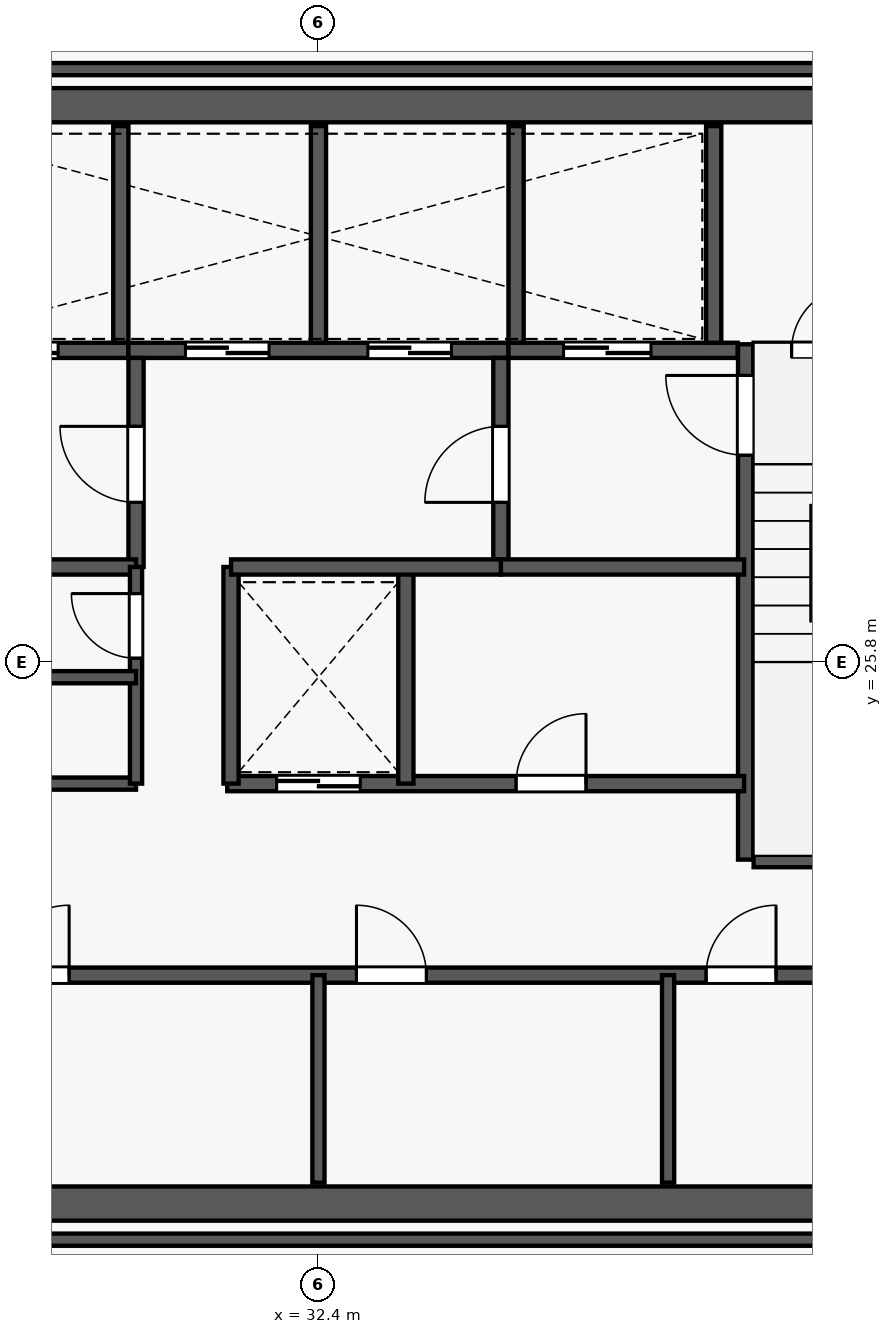
"""IFC4 building model, lengths in metres.
Left out: names, types, materials, properties, quantities, classifications, styles, units other than length and angle.
Written with IfcOpenShell. Run it as: python <this file> out.ifc"""

import sys

from ifc_helpers import new_model, si_unit, direction, frame, frame_2d, origin, place, context, subcontext, project, spatial, rectangle, extrude, element, fill, save


model = new_model("IFC4")
c1 = context("Model", 3, precision=1e-05, world=origin(), true_north=direction((0.0, 1.0)))
c2 = subcontext(c1, "Body", "Model", "MODEL_VIEW")
j1 = project(units=[si_unit("LENGTHUNIT", "METRE"), si_unit("PLANEANGLEUNIT", "RADIAN")], contexts=[c1])
p1 = place(None, origin())
s1 = spatial("IfcSite", under=j1, at=p1, CompositionType="ELEMENT")
p2 = place(p1, origin())
s2 = spatial("IfcBuilding", under=s1, at=p2, CompositionType="ELEMENT")
p3 = place(p2, frame((0.0, 0.0, 278.1)))
s3 = spatial("IfcBuildingStorey", under=s2, at=p3, CompositionType="ELEMENT", Elevation=278.1)
for number, where, z_axis, x_axis in (
    (1, (23.5, 18.675, 0.0), (0.0, 0.0, 1.0), (1.0, 0.0, 0.0)),
    (2, (23.5, 33.125, 0.0), (0.0, 0.0, 1.0), (1.0, 0.0, 0.0)),
):
    element("IfcWall", number, at=place(p3, frame(where, z_axis=z_axis, x_axis=x_axis)), inside=s3, PredefinedType="SHEAR", context=c2, shape_type="SweptSolid", body=[
        extrude(rectangle(XDim=17.8, YDim=0.45, at=frame_2d((8.9, 0.0))), origin(), (0.0, 0.0, 1.0), 5.2),
    ])
p4 = place(p3, frame((38.02, 23.2, 0.0), z_axis=(0.0, 0.0, 1.0), x_axis=(0.0, 1.0, 0.0)))
e3 = element("IfcWall", 3, at=p4, inside=s3, PredefinedType="SHEAR", context=c2, shape_type="SweptSolid", body=[
    extrude(rectangle(XDim=6.78, YDim=0.2, at=frame_2d((3.39, 0.0))), origin(), (0.0, 0.0, 1.0), 5.4),
])
p5 = place(p4, frame((5.32, 0.0, 0.0)))
e4 = element("IfcOpeningElement", 4, at=p5, cuts=e3, PredefinedType="OPENING", context=c2, shape_type="SweptSolid", body=[
    extrude(rectangle(XDim=1.05, YDim=2.15, at=frame_2d((0.525, 1.075))), frame((0.0, 0.11, 0.0), z_axis=(0.0, -1.0, 0.0), x_axis=(1.0, 0.0, 0.0)), (0.0, 0.0, 1.0), 0.22),
])
p6 = place(p3, frame((38.125, 23.2, 0.0), z_axis=(0.0, 0.0, 1.0), x_axis=(1.0, 0.0, 0.0)))
e5 = element("IfcWall", 5, at=p6, inside=s3, PredefinedType="PLUMBINGWALL", context=c2, shape_type="SweptSolid", body=[
    extrude(rectangle(XDim=3.27, YDim=0.2, at=frame_2d((1.635, 0.0))), origin(), (0.0, 0.0, 1.0), 5.2),
])
p7 = place(p3, frame((26.885, 29.9, 0.0), z_axis=(0.0, 0.0, 1.0), x_axis=(1.0, 0.0, 0.0)))
e6 = element("IfcWall", 6, at=p7, inside=s3, PredefinedType="PLUMBINGWALL", context=c2, shape_type="SweptSolid", body=[
    extrude(rectangle(XDim=3.015, YDim=0.2, at=frame_2d((1.507, 0.0))), origin(), (0.0, 0.0, 1.0), 5.2),
])
p8 = place(p7, frame((0.94, 0.0, 0.0)))
e7 = element("IfcOpeningElement", 7, at=p8, cuts=e6, PredefinedType="OPENING", context=c2, shape_type="SweptSolid", body=[
    extrude(rectangle(XDim=1.15, YDim=2.2, at=frame_2d((0.575, 1.1))), frame((0.0, 0.11, 0.0), z_axis=(0.0, -1.0, 0.0), x_axis=(1.0, 0.0, 0.0)), (0.0, 0.0, 1.0), 0.22),
])
p9 = place(p3, frame((29.9, 29.9, 0.0), z_axis=(0.0, 0.0, 1.0), x_axis=(1.0, 0.0, 0.0)))
e8 = element("IfcWall", 8, at=p9, inside=s3, PredefinedType="PLUMBINGWALL", context=c2, shape_type="SweptSolid", body=[
    extrude(rectangle(XDim=5.0, YDim=0.2, at=frame_2d((2.5, 0.0))), origin(), (0.0, 0.0, 1.0), 5.2),
])
p10 = place(p9, frame((0.75, 0.0, 0.0)))
e9 = element("IfcOpeningElement", 9, at=p10, cuts=e8, PredefinedType="OPENING", context=c2, shape_type="SweptSolid", body=[
    extrude(rectangle(XDim=1.1, YDim=2.2, at=frame_2d((0.55, 1.1))), frame((0.0, 0.11, 0.0), z_axis=(0.0, -1.0, 0.0), x_axis=(1.0, 0.0, 0.0)), (0.0, 0.0, 1.0), 0.22),
])
p11 = place(p9, frame((3.15, 0.0, 0.0)))
e10 = element("IfcOpeningElement", 10, at=p11, cuts=e8, PredefinedType="OPENING", context=c2, shape_type="SweptSolid", body=[
    extrude(rectangle(XDim=1.1, YDim=2.2, at=frame_2d((0.55, 1.1))), frame((0.0, 0.11, 0.0), z_axis=(0.0, -1.0, 0.0), x_axis=(1.0, 0.0, 0.0)), (0.0, 0.0, 1.0), 0.22),
])
p12 = place(p3, frame((34.9, 29.9, 0.0), z_axis=(0.0, 0.0, 1.0), x_axis=(1.0, 0.0, 0.0)))
e11 = element("IfcWall", 11, at=p12, inside=s3, PredefinedType="PLUMBINGWALL", context=c2, shape_type="SweptSolid", body=[
    extrude(rectangle(XDim=3.015, YDim=0.2, at=frame_2d((1.508, 0.0))), origin(), (0.0, 0.0, 1.0), 5.2),
])
p13 = place(p12, frame((0.725, 0.0, 0.0)))
e12 = element("IfcOpeningElement", 12, at=p13, cuts=e11, PredefinedType="OPENING", context=c2, shape_type="SweptSolid", body=[
    extrude(rectangle(XDim=1.15, YDim=2.2, at=frame_2d((0.575, 1.1))), frame((0.0, 0.11, 0.0), z_axis=(0.0, -1.0, 0.0), x_axis=(1.0, 0.0, 0.0)), (0.0, 0.0, 1.0), 0.22),
])
p14 = place(p3, frame((38.125, 29.9, 0.0), z_axis=(0.0, 0.0, 1.0), x_axis=(1.0, 0.0, 0.0)))
e13 = element("IfcWall", 13, at=p14, inside=s3, PredefinedType="PLUMBINGWALL", context=c2, shape_type="SweptSolid", body=[
    extrude(rectangle(XDim=3.27, YDim=0.2, at=frame_2d((1.635, 0.0))), origin(), (0.0, 0.0, 1.0), 5.2),
])
p15 = place(p14, frame((0.5, 0.0, 0.0)))
e14 = element("IfcOpeningElement", 14, at=p15, cuts=e13, PredefinedType="OPENING", context=c2, shape_type="SweptSolid", body=[
    extrude(rectangle(XDim=0.85, YDim=2.05, at=frame_2d((0.425, 1.025))), frame((0.0, 0.11, 0.0), z_axis=(0.0, -1.0, 0.0), x_axis=(1.0, 0.0, 0.0)), (0.0, 0.0, 1.0), 0.22),
])
for number, where, z_axis, x_axis in (
    (15, (29.8, 30.0, 0.0), (0.0, 0.0, 1.0), (0.0, 1.0, 0.0)),
    (16, (32.4, 30.0, 0.0), (0.0, 0.0, 1.0), (0.0, 1.0, 0.0)),
    (17, (35.0, 30.0, 0.0), (0.0, 0.0, 1.0), (0.0, 1.0, 0.0)),
    (18, (37.6, 30.0, 0.0), (0.0, 0.0, 1.0), (0.0, 1.0, 0.0)),
):
    element("IfcWall", number, at=place(p3, frame(where, z_axis=z_axis, x_axis=x_axis)), inside=s3, PredefinedType="PLUMBINGWALL", context=c2, shape_type="SweptSolid", body=[
        extrude(rectangle(XDim=2.85, YDim=0.2, at=frame_2d((1.425, 0.0))), origin(), (0.0, 0.0, 1.0), 5.2),
    ])
p16 = place(p3, frame((30.0, 27.05, 0.0), z_axis=(0.0, 0.0, 1.0), x_axis=(0.0, 1.0, 0.0)))
e19 = element("IfcWall", 19, at=p16, inside=s3, PredefinedType="PLUMBINGWALL", context=c2, shape_type="SweptSolid", body=[
    extrude(rectangle(XDim=2.75, YDim=0.2, at=frame_2d((1.375, 0.0))), origin(), (0.0, 0.0, 1.0), 5.2),
])
p17 = place(p16, frame((0.85, 0.0, 0.0)))
e20 = element("IfcOpeningElement", 20, at=p17, cuts=e19, PredefinedType="OPENING", context=c2, shape_type="SweptSolid", body=[
    extrude(rectangle(XDim=1.0, YDim=2.15, at=frame_2d((0.5, 1.075))), frame((0.0, 0.11, 0.0), z_axis=(0.0, -1.0, 0.0), x_axis=(1.0, 0.0, 0.0)), (0.0, 0.0, 1.0), 0.22),
])
p18 = place(p3, frame((26.8, 27.05, 0.0), z_axis=(0.0, 0.0, 1.0), x_axis=(1.0, 0.0, 0.0)))
e21 = element("IfcWall", 21, at=p18, inside=s3, PredefinedType="PLUMBINGWALL", context=c2, shape_type="SweptSolid", body=[
    extrude(rectangle(XDim=3.2, YDim=0.2, at=frame_2d((1.6, 0.0))), origin(), (0.0, 0.0, 1.0), 5.2),
])
p19 = place(p3, frame((34.8, 27.05, 0.0), z_axis=(0.0, 0.0, 1.0), x_axis=(0.0, 1.0, 0.0)))
e22 = element("IfcWall", 22, at=p19, inside=s3, PredefinedType="PLUMBINGWALL", context=c2, shape_type="SweptSolid", body=[
    extrude(rectangle(XDim=2.75, YDim=0.2, at=frame_2d((1.375, 0.0))), origin(), (0.0, 0.0, 1.0), 5.2),
])
p20 = place(p19, frame((0.85, 0.0, 0.0)))
e23 = element("IfcOpeningElement", 23, at=p20, cuts=e22, PredefinedType="OPENING", context=c2, shape_type="SweptSolid", body=[
    extrude(rectangle(XDim=1.0, YDim=2.15, at=frame_2d((0.5, 1.075))), frame((0.0, 0.11, 0.0), z_axis=(0.0, -1.0, 0.0), x_axis=(1.0, 0.0, 0.0)), (0.0, 0.0, 1.0), 0.22),
])
p21 = place(p3, frame((34.8, 27.05, 0.0), z_axis=(0.0, 0.0, 1.0), x_axis=(1.0, 0.0, 0.0)))
e24 = element("IfcWall", 24, at=p21, inside=s3, PredefinedType="PLUMBINGWALL", context=c2, shape_type="SweptSolid", body=[
    extrude(rectangle(XDim=3.2, YDim=0.2, at=frame_2d((1.6, 0.0))), origin(), (0.0, 0.0, 1.0), 5.2),
])
p22 = place(p3, frame((26.8, 24.2, 0.0), z_axis=(0.0, 0.0, 1.0), x_axis=(1.0, 0.0, 0.0)))
e25 = element("IfcWall", 25, at=p22, inside=s3, PredefinedType="PARTITIONING", context=c2, shape_type="SweptSolid", body=[
    extrude(rectangle(XDim=3.2, YDim=0.16, at=frame_2d((1.6, 0.0))), origin(), (0.0, 0.0, 1.0), 5.2),
])
p23 = place(p22, frame((0.9, 0.0, 0.0)))
e26 = element("IfcOpeningElement", 26, at=p23, cuts=e25, PredefinedType="OPENING", context=c2, shape_type="SweptSolid", body=[
    extrude(rectangle(XDim=0.85, YDim=2.05, at=frame_2d((0.425, 1.025))), frame((0.0, 0.09, 0.0), z_axis=(0.0, -1.0, 0.0), x_axis=(1.0, 0.0, 0.0)), (0.0, 0.0, 1.0), 0.18),
])
p24 = place(p3, frame((30.0, 24.2, 0.0), z_axis=(0.0, 0.0, 1.0), x_axis=(0.0, 1.0, 0.0)))
e27 = element("IfcWall", 27, at=p24, inside=s3, PredefinedType="PARTITIONING", context=c2, shape_type="SweptSolid", body=[
    extrude(rectangle(XDim=2.85, YDim=0.16, at=frame_2d((1.425, 0.0))), origin(), (0.0, 0.0, 1.0), 5.2),
])
p25 = place(p24, frame((1.65, 0.0, 0.0)))
e28 = element("IfcOpeningElement", 28, at=p25, cuts=e27, PredefinedType="OPENING", context=c2, shape_type="SweptSolid", body=[
    extrude(rectangle(XDim=0.85, YDim=2.05, at=frame_2d((0.425, 1.025))), frame((0.0, 0.09, 0.0), z_axis=(0.0, -1.0, 0.0), x_axis=(1.0, 0.0, 0.0)), (0.0, 0.0, 1.0), 0.18),
])
p26 = place(p3, frame((31.2, 24.2, 0.0), z_axis=(0.0, 0.0, 1.0), x_axis=(1.0, 0.0, 0.0)))
e29 = element("IfcWall", 29, at=p26, inside=s3, PredefinedType="PLUMBINGWALL", context=c2, shape_type="SweptSolid", body=[
    extrude(rectangle(XDim=6.8, YDim=0.2, at=frame_2d((3.4, 0.0))), origin(), (0.0, 0.0, 1.0), 5.2),
])
p27 = place(p26, frame((0.65, 0.0, 0.0)))
e30 = element("IfcOpeningElement", 30, at=p27, cuts=e29, PredefinedType="OPENING", context=c2, shape_type="SweptSolid", body=[
    extrude(rectangle(XDim=1.1, YDim=2.2, at=frame_2d((0.55, 1.1))), frame((0.0, 0.11, 0.0), z_axis=(0.0, -1.0, 0.0), x_axis=(1.0, 0.0, 0.0)), (0.0, 0.0, 1.0), 0.22),
])
p28 = place(p26, frame((3.8, 0.0, 0.0)))
e31 = element("IfcOpeningElement", 31, at=p28, cuts=e29, PredefinedType="OPENING", context=c2, shape_type="SweptSolid", body=[
    extrude(rectangle(XDim=0.92, YDim=2.15, at=frame_2d((0.46, 1.075))), frame((0.0, 0.11, 0.0), z_axis=(0.0, -1.0, 0.0), x_axis=(1.0, 0.0, 0.0)), (0.0, 0.0, 1.0), 0.22),
])
for number, where, z_axis, x_axis in (
    (32, (31.25, 24.2, 0.0), (0.0, 0.0, 1.0), (0.0, 1.0, 0.0)),
    (33, (33.55, 24.2, 0.0), (0.0, 0.0, 1.0), (0.0, 1.0, 0.0)),
):
    element("IfcWall", number, at=place(p3, frame(where, z_axis=z_axis, x_axis=x_axis)), inside=s3, PredefinedType="PLUMBINGWALL", context=c2, shape_type="SweptSolid", body=[
        extrude(rectangle(XDim=2.85, YDim=0.2, at=frame_2d((1.425, 0.0))), origin(), (0.0, 0.0, 1.0), 5.2),
    ])
p29 = place(p3, frame((31.25, 27.05, 0.0), z_axis=(0.0, 0.0, 1.0), x_axis=(1.0, 0.0, 0.0)))
e34 = element("IfcWall", 34, at=p29, inside=s3, PredefinedType="PLUMBINGWALL", context=c2, shape_type="SweptSolid", body=[
    extrude(rectangle(XDim=3.55, YDim=0.2, at=frame_2d((1.775, 0.0))), origin(), (0.0, 0.0, 1.0), 5.2),
])
p30 = place(p3, frame((26.8, 25.6, 0.0), z_axis=(0.0, 0.0, 1.0), x_axis=(1.0, 0.0, 0.0)))
e35 = element("IfcWall", 35, at=p30, inside=s3, PredefinedType="PARTITIONING", context=c2, shape_type="SweptSolid", body=[
    extrude(rectangle(XDim=3.2, YDim=0.16, at=frame_2d((1.6, 0.0))), origin(), (0.0, 0.0, 1.0), 5.2),
])
p31 = place(p3, frame((23.42, 21.68, 0.0), z_axis=(0.0, 0.0, 1.0), x_axis=(1.0, 0.0, 0.0)))
e36 = element("IfcWall", 36, at=p31, inside=s3, PredefinedType="PLUMBINGWALL", context=c2, shape_type="SweptSolid", body=[
    extrude(rectangle(XDim=17.96, YDim=0.2, at=frame_2d((8.98, 0.0))), origin(), (0.0, 0.0, 1.0), 5.2),
])
p32 = place(p31, frame((0.46, 0.0, 0.0)))
e37 = element("IfcOpeningElement", 37, at=p32, cuts=e36, PredefinedType="OPENING", context=c2, shape_type="SweptSolid", body=[
    extrude(rectangle(XDim=0.92, YDim=2.15, at=frame_2d((0.46, 1.075))), frame((0.0, 0.11, 0.0), z_axis=(0.0, -1.0, 0.0), x_axis=(1.0, 0.0, 0.0)), (0.0, 0.0, 1.0), 0.22),
])
p33 = place(p31, frame((4.78, 0.0, 0.0)))
e38 = element("IfcOpeningElement", 38, at=p33, cuts=e36, PredefinedType="OPENING", context=c2, shape_type="SweptSolid", body=[
    extrude(rectangle(XDim=0.92, YDim=2.15, at=frame_2d((0.46, 1.075))), frame((0.0, 0.11, 0.0), z_axis=(0.0, -1.0, 0.0), x_axis=(1.0, 0.0, 0.0)), (0.0, 0.0, 1.0), 0.22),
])
p34 = place(p31, frame((9.48, 0.0, 0.0)))
e39 = element("IfcOpeningElement", 39, at=p34, cuts=e36, PredefinedType="OPENING", context=c2, shape_type="SweptSolid", body=[
    extrude(rectangle(XDim=0.92, YDim=2.15, at=frame_2d((0.46, 1.075))), frame((0.0, 0.11, 0.0), z_axis=(0.0, -1.0, 0.0), x_axis=(1.0, 0.0, 0.0)), (0.0, 0.0, 1.0), 0.22),
])
p35 = place(p31, frame((14.08, 0.0, 0.0)))
e40 = element("IfcOpeningElement", 40, at=p35, cuts=e36, PredefinedType="OPENING", context=c2, shape_type="SweptSolid", body=[
    extrude(rectangle(XDim=0.92, YDim=2.15, at=frame_2d((0.46, 1.075))), frame((0.0, 0.11, 0.0), z_axis=(0.0, -1.0, 0.0), x_axis=(1.0, 0.0, 0.0)), (0.0, 0.0, 1.0), 0.22),
])
for number, where, z_axis, x_axis in (
    (41, (32.4, 18.95, 0.0), (0.0, 0.0, 1.0), (0.0, 1.0, 0.0)),
    (42, (37.0, 18.95, 0.0), (0.0, 0.0, 1.0), (0.0, 1.0, 0.0)),
):
    element("IfcWall", number, at=place(p3, frame(where, z_axis=z_axis, x_axis=x_axis)), inside=s3, PredefinedType="PARTITIONING", context=c2, shape_type="SweptSolid", body=[
        extrude(rectangle(XDim=2.73, YDim=0.16, at=frame_2d((1.365, 0.0))), origin(), (0.0, 0.0, 1.0), 5.2),
    ])
p36 = place(p3, frame((14.978, 18.2, 0.0), z_axis=(0.0, 0.0, 1.0), x_axis=(1.0, 0.0, 0.0)))
e43 = element("IfcWall", 43, at=p36, inside=s3, PredefinedType="PARTITIONING", context=c2, shape_type="SweptSolid", body=[
    extrude(rectangle(XDim=34.844, YDim=0.16, at=frame_2d((17.422, 0.0))), origin(), (0.0, 0.0, 1.0), 5.2),
])
p37 = place(p36, frame((5.972, 0.0, 0.0)))
e44 = element("IfcOpeningElement", 44, at=p37, cuts=e43, PredefinedType="OPENING", context=c2, shape_type="SweptSolid", body=[
    extrude(rectangle(XDim=1.35, YDim=2.35, at=frame_2d((0.675, 1.175))), frame((0.0, 0.09, 0.0), z_axis=(0.0, -1.0, 0.0), x_axis=(1.0, 0.0, 0.0)), (0.0, 0.0, 1.0), 0.18),
])
p38 = place(p36, frame((27.722, 0.0, 0.0)))
e45 = element("IfcOpeningElement", 45, at=p38, cuts=e43, PredefinedType="OPENING", context=c2, shape_type="SweptSolid", body=[
    extrude(rectangle(XDim=1.35, YDim=2.35, at=frame_2d((0.675, 1.175))), frame((0.0, 0.09, 0.0), z_axis=(0.0, -1.0, 0.0), x_axis=(1.0, 0.0, 0.0)), (0.0, 0.0, 1.0), 0.18),
])
p39 = place(p3, frame((15.079, 33.6, 0.0), z_axis=(0.0, 0.0, 1.0), x_axis=(1.0, 0.0, 0.0)))
e46 = element("IfcWall", 46, at=p39, inside=s3, PredefinedType="PARTITIONING", context=c2, shape_type="SweptSolid", body=[
    extrude(rectangle(XDim=34.642, YDim=0.16, at=frame_2d((17.321, 0.0))), origin(), (0.0, 0.0, 1.0), 5.2),
])
p40 = place(p39, frame((5.871, 0.0, 0.0)))
e47 = element("IfcOpeningElement", 47, at=p40, cuts=e46, PredefinedType="OPENING", context=c2, shape_type="SweptSolid", body=[
    extrude(rectangle(XDim=1.35, YDim=2.35, at=frame_2d((0.675, 1.175))), frame((0.0, 0.09, 0.0), z_axis=(0.0, -1.0, 0.0), x_axis=(1.0, 0.0, 0.0)), (0.0, 0.0, 1.0), 0.18),
])
p41 = place(p39, frame((27.271, 0.0, 0.0)))
e48 = element("IfcOpeningElement", 48, at=p41, cuts=e46, PredefinedType="OPENING", context=c2, shape_type="SweptSolid", body=[
    extrude(rectangle(XDim=1.35, YDim=2.35, at=frame_2d((0.675, 1.175))), frame((0.0, 0.09, 0.0), z_axis=(0.0, -1.0, 0.0), x_axis=(1.0, 0.0, 0.0)), (0.0, 0.0, 1.0), 0.18),
])
p42 = place(p5, origin())
e49 = element("IfcDoor", 49, at=p42, inside=s3, OperationType="SINGLE_SWING_RIGHT", PredefinedType="DOOR", context=c2, shape_type="SweptSolid", body=[
    extrude(rectangle(XDim=1.05, YDim=2.15, at=frame_2d((0.525, 1.075))), frame((0.0, 0.025, 0.0), z_axis=(0.0, -1.0, 0.0), x_axis=(1.0, 0.0, 0.0)), (0.0, 0.0, 1.0), 0.05),
])
fill(e4, e49)
p43 = place(p15, origin())
e50 = element("IfcDoor", 50, at=p43, inside=s3, OperationType="SINGLE_SWING_RIGHT", PredefinedType="DOOR", context=c2, shape_type="SweptSolid", body=[
    extrude(rectangle(XDim=0.85, YDim=2.05, at=frame_2d((0.425, 1.025))), frame((0.0, 0.025, 0.0), z_axis=(0.0, -1.0, 0.0), x_axis=(1.0, 0.0, 0.0)), (0.0, 0.0, 1.0), 0.05),
])
fill(e14, e50)
p44 = place(p8, origin())
e51 = element("IfcDoor", 51, at=p44, inside=s3, OperationType="DOUBLE_DOOR_SLIDING", PredefinedType="DOOR", context=c2, shape_type="SweptSolid", body=[
    extrude(rectangle(XDim=1.15, YDim=2.2, at=frame_2d((0.575, 1.1))), frame((0.0, 0.025, 0.0), z_axis=(0.0, -1.0, 0.0), x_axis=(1.0, 0.0, 0.0)), (0.0, 0.0, 1.0), 0.05),
])
fill(e7, e51)
p45 = place(p13, origin())
e52 = element("IfcDoor", 52, at=p45, inside=s3, OperationType="DOUBLE_DOOR_SLIDING", PredefinedType="DOOR", context=c2, shape_type="SweptSolid", body=[
    extrude(rectangle(XDim=1.15, YDim=2.2, at=frame_2d((0.575, 1.1))), frame((0.0, 0.025, 0.0), z_axis=(0.0, -1.0, 0.0), x_axis=(1.0, 0.0, 0.0)), (0.0, 0.0, 1.0), 0.05),
])
fill(e12, e52)
p46 = place(p10, origin())
e53 = element("IfcDoor", 53, at=p46, inside=s3, OperationType="DOUBLE_DOOR_SLIDING", PredefinedType="DOOR", context=c2, shape_type="SweptSolid", body=[
    extrude(rectangle(XDim=1.1, YDim=2.2, at=frame_2d((0.55, 1.1))), frame((0.0, 0.025, 0.0), z_axis=(0.0, -1.0, 0.0), x_axis=(1.0, 0.0, 0.0)), (0.0, 0.0, 1.0), 0.05),
])
fill(e9, e53)
p47 = place(p11, origin())
e54 = element("IfcDoor", 54, at=p47, inside=s3, OperationType="DOUBLE_DOOR_SLIDING", PredefinedType="DOOR", context=c2, shape_type="SweptSolid", body=[
    extrude(rectangle(XDim=1.1, YDim=2.2, at=frame_2d((0.55, 1.1))), frame((0.0, 0.025, 0.0), z_axis=(0.0, -1.0, 0.0), x_axis=(1.0, 0.0, 0.0)), (0.0, 0.0, 1.0), 0.05),
])
fill(e10, e54)
p48 = place(p17, origin())
e55 = element("IfcDoor", 55, at=p48, inside=s3, OperationType="SINGLE_SWING_RIGHT", PredefinedType="DOOR", context=c2, shape_type="SweptSolid", body=[
    extrude(rectangle(XDim=1.0, YDim=2.15, at=frame_2d((0.5, 1.075))), frame((0.0, 0.025, 0.0), z_axis=(0.0, -1.0, 0.0), x_axis=(1.0, 0.0, 0.0)), (0.0, 0.0, 1.0), 0.05),
])
fill(e20, e55)
p49 = place(p20, origin())
e56 = element("IfcDoor", 56, at=p49, inside=s3, OperationType="SINGLE_SWING_LEFT", PredefinedType="DOOR", context=c2, shape_type="SweptSolid", body=[
    extrude(rectangle(XDim=1.0, YDim=2.15, at=frame_2d((0.5, 1.075))), frame((0.0, 0.025, 0.0), z_axis=(0.0, -1.0, 0.0), x_axis=(1.0, 0.0, 0.0)), (0.0, 0.0, 1.0), 0.05),
])
fill(e23, e56)
p50 = place(p27, origin())
e57 = element("IfcDoor", 57, at=p50, inside=s3, OperationType="DOUBLE_DOOR_SLIDING", PredefinedType="DOOR", context=c2, shape_type="SweptSolid", body=[
    extrude(rectangle(XDim=1.1, YDim=2.2, at=frame_2d((0.55, 1.1))), frame((0.0, 0.025, 0.0), z_axis=(0.0, -1.0, 0.0), x_axis=(1.0, 0.0, 0.0)), (0.0, 0.0, 1.0), 0.05),
])
fill(e30, e57)
p51 = place(p25, origin())
e58 = element("IfcDoor", 58, at=p51, inside=s3, OperationType="SINGLE_SWING_RIGHT", PredefinedType="DOOR", context=c2, shape_type="SweptSolid", body=[
    extrude(rectangle(XDim=0.85, YDim=2.05, at=frame_2d((0.425, 1.025))), frame((0.0, 0.025, 0.0), z_axis=(0.0, -1.0, 0.0), x_axis=(1.0, 0.0, 0.0)), (0.0, 0.0, 1.0), 0.05),
])
fill(e28, e58)
p52 = place(p28, origin())
e59 = element("IfcDoor", 59, at=p52, inside=s3, OperationType="SINGLE_SWING_RIGHT", PredefinedType="DOOR", context=c2, shape_type="SweptSolid", body=[
    extrude(rectangle(XDim=0.92, YDim=2.15, at=frame_2d((0.46, 1.075))), frame((0.0, 0.025, 0.0), z_axis=(0.0, -1.0, 0.0), x_axis=(1.0, 0.0, 0.0)), (0.0, 0.0, 1.0), 0.05),
])
fill(e31, e59)
p53 = place(p33, origin())
e60 = element("IfcDoor", 60, at=p53, inside=s3, OperationType="SINGLE_SWING_RIGHT", PredefinedType="DOOR", context=c2, shape_type="SweptSolid", body=[
    extrude(rectangle(XDim=0.92, YDim=2.15, at=frame_2d((0.46, 1.075))), frame((0.0, 0.025, 0.0), z_axis=(0.0, -1.0, 0.0), x_axis=(1.0, 0.0, 0.0)), (0.0, 0.0, 1.0), 0.05),
])
fill(e38, e60)
p54 = place(p34, origin())
e61 = element("IfcDoor", 61, at=p54, inside=s3, OperationType="SINGLE_SWING_LEFT", PredefinedType="DOOR", context=c2, shape_type="SweptSolid", body=[
    extrude(rectangle(XDim=0.92, YDim=2.15, at=frame_2d((0.46, 1.075))), frame((0.0, 0.025, 0.0), z_axis=(0.0, -1.0, 0.0), x_axis=(1.0, 0.0, 0.0)), (0.0, 0.0, 1.0), 0.05),
])
fill(e39, e61)
p55 = place(p35, origin())
e62 = element("IfcDoor", 62, at=p55, inside=s3, OperationType="SINGLE_SWING_RIGHT", PredefinedType="DOOR", context=c2, shape_type="SweptSolid", body=[
    extrude(rectangle(XDim=0.92, YDim=2.15, at=frame_2d((0.46, 1.075))), frame((0.0, 0.025, 0.0), z_axis=(0.0, -1.0, 0.0), x_axis=(1.0, 0.0, 0.0)), (0.0, 0.0, 1.0), 0.05),
])
fill(e40, e62)
save(model, sys.argv[1])
